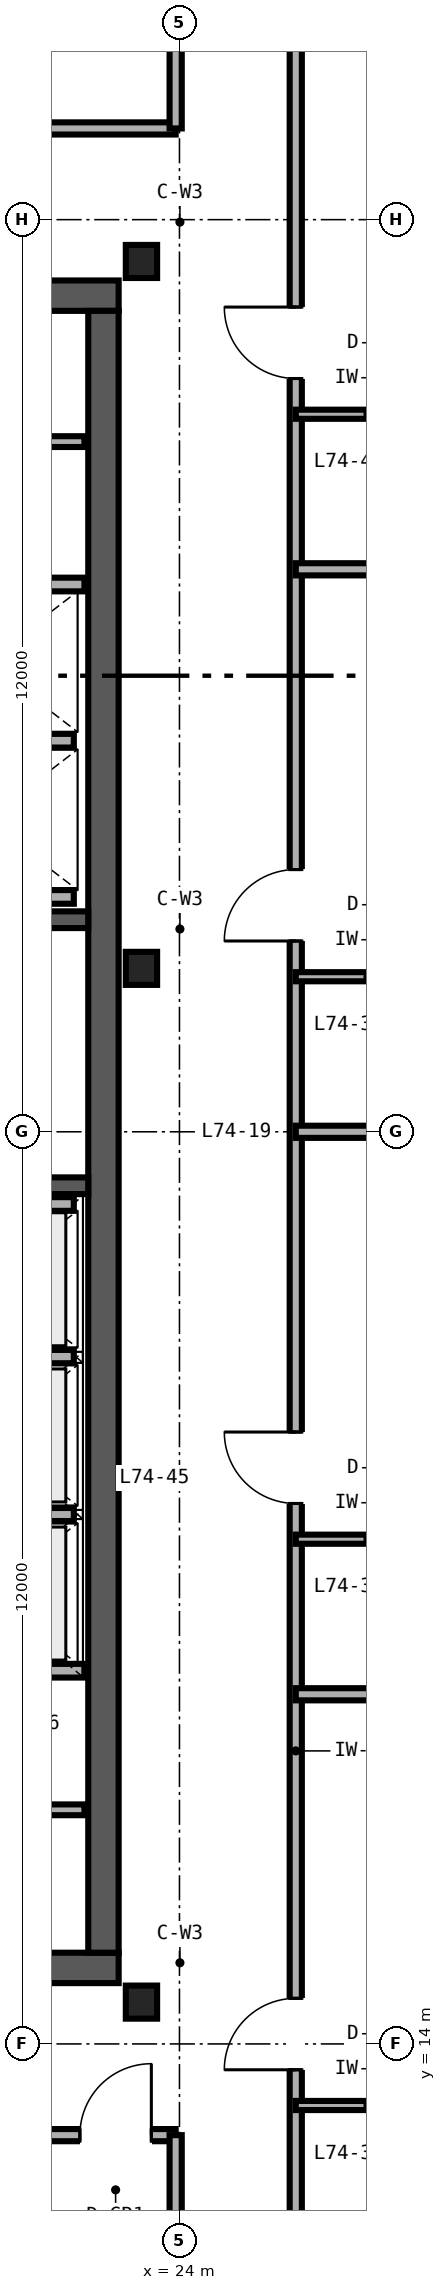
"""IFC4 building model, lengths in metres.
Left out: names, types, materials, properties, quantities, classifications, styles, units other than length and angle.
Written with IfcOpenShell. Run it as: python <this file> out.ifc"""

import sys

from ifc_helpers import new_model, si_unit, direction, frame, frame_2d, origin, origin_2d, place, context, subcontext, project, spatial, rectangle, i_section, extrude, source, transform, mapped, element, fill, save


model = new_model("IFC4")
c1 = context("Model", 3, precision=1e-05, world=origin(), true_north=direction((0.0, 1.0)))
c2 = subcontext(c1, "Body", "Model", "MODEL_VIEW")
j1 = project(units=[si_unit("LENGTHUNIT", "METRE"), si_unit("PLANEANGLEUNIT", "RADIAN")], contexts=[c1])
p1 = place(None, origin())
s1 = spatial("IfcSite", under=j1, at=p1, CompositionType="ELEMENT")
p2 = place(p1, origin())
s2 = spatial("IfcBuilding", under=s1, at=p2, CompositionType="ELEMENT")
p3 = place(p2, frame((0.0, 0.0, 290.4)))
s3 = spatial("IfcBuildingStorey", under=s2, at=p3, CompositionType="ELEMENT", Elevation=290.4)
p4 = place(p3, frame((10.8, 15.0, 0.0), z_axis=(0.0, 0.0, 1.0), x_axis=(1.0, 0.0, 0.0)))
e1 = element("IfcWall", 1, at=p4, inside=s3, PredefinedType="SHEAR", context=c2, shape_type="SweptSolid", body=[
    extrude(rectangle(XDim=12.4, YDim=0.4, at=frame_2d((6.2, 0.0))), origin(), (0.0, 0.0, 1.0), 3.38),
])
p5 = place(p4, frame((10.1, 0.0, 0.0)))
e2 = element("IfcOpeningElement", 2, at=p5, cuts=e1, PredefinedType="OPENING", context=c2, shape_type="SweptSolid", body=[
    extrude(rectangle(XDim=1.0, YDim=2.15, at=frame_2d((0.5, 1.075))), frame((0.0, 0.21, 0.0), z_axis=(0.0, -1.0, 0.0), x_axis=(1.0, 0.0, 0.0)), (0.0, 0.0, 1.0), 0.42),
])
p6 = place(p3, frame((10.8, 37.0, 0.0), z_axis=(0.0, 0.0, 1.0), x_axis=(1.0, 0.0, 0.0)))
e3 = element("IfcWall", 3, at=p6, inside=s3, PredefinedType="SHEAR", context=c2, shape_type="SweptSolid", body=[
    extrude(rectangle(XDim=12.4, YDim=0.4, at=frame_2d((6.2, 0.0))), origin(), (0.0, 0.0, 1.0), 3.38),
])
p7 = place(p6, frame((10.3, 0.0, 0.0)))
e4 = element("IfcOpeningElement", 4, at=p7, cuts=e3, PredefinedType="OPENING", context=c2, shape_type="SweptSolid", body=[
    extrude(rectangle(XDim=1.0, YDim=2.15, at=frame_2d((0.5, 1.075))), frame((0.0, 0.21, 0.0), z_axis=(0.0, -1.0, 0.0), x_axis=(1.0, 0.0, 0.0)), (0.0, 0.0, 1.0), 0.42),
])
p8 = place(p3, frame((23.0, 15.2, 0.0), z_axis=(0.0, 0.0, 1.0), x_axis=(0.0, 1.0, 0.0)))
e5 = element("IfcWall", 5, at=p8, inside=s3, PredefinedType="SHEAR", context=c2, shape_type="SweptSolid", body=[
    extrude(rectangle(XDim=21.6, YDim=0.4, at=frame_2d((10.8, 0.0))), origin(), (0.0, 0.0, 1.0), 3.38),
])
p9 = place(p3, frame((14.18, 25.29, 0.0), z_axis=(0.0, 0.0, 1.0), x_axis=(1.0, 0.0, 0.0)))
e6 = element("IfcWall", 6, at=p9, inside=s3, PredefinedType="SHEAR", context=c2, shape_type="SweptSolid", body=[
    extrude(rectangle(XDim=8.62, YDim=0.22, at=frame_2d((4.31, 0.0))), origin(), (0.0, 0.0, 1.0), 3.4),
])
p10 = place(p9, frame((0.47, 0.0, 0.0)))
e7 = element("IfcOpeningElement", 7, at=p10, cuts=e6, PredefinedType="OPENING", context=c2, shape_type="SweptSolid", body=[
    extrude(rectangle(XDim=1.05, YDim=2.15, at=frame_2d((0.525, 1.075))), frame((0.0, 0.12, 0.0), z_axis=(0.0, -1.0, 0.0), x_axis=(1.0, 0.0, 0.0)), (0.0, 0.0, 1.0), 0.24),
])
p11 = place(p3, frame((14.18, 28.79, 0.0), z_axis=(0.0, 0.0, 1.0), x_axis=(1.0, 0.0, 0.0)))
e8 = element("IfcWall", 8, at=p11, inside=s3, PredefinedType="SHEAR", context=c2, shape_type="SweptSolid", body=[
    extrude(rectangle(XDim=8.62, YDim=0.22, at=frame_2d((4.31, 0.0))), origin(), (0.0, 0.0, 1.0), 3.4),
])
m1 = source(origin(), c2, "Body", "SweptSolid", [
    extrude(i_section(OverallWidth=0.412, OverallDepth=0.435, WebThickness=0.036, FlangeThickness=0.057, FilletRadius=0.025, at=origin_2d()), origin(), (0.0, 0.0, 1.0), 3.38),
])
for number, where, z_axis, x_axis in (
    (9, (23.5, 14.55, 0.0), (0.0, 0.0, 1.0), (1.0, 0.0, 0.0)),
    (10, (23.5, 28.15, 0.0), (0.0, 0.0, 1.0), (1.0, 0.0, 0.0)),
    (11, (23.5, 37.45, 0.0), (0.0, 0.0, 1.0), (1.0, 0.0, 0.0)),
):
    element("IfcColumn", number, at=place(p3, frame(where, z_axis=z_axis, x_axis=x_axis)), inside=s3, PredefinedType="COLUMN", context=c2, shape_type="MappedRepresentation", body=[
        mapped(m1, transform((0.0, 0.0, 0.0), scale=1.0)),
    ])
p12 = place(p3, frame((20.12, 18.91, 0.0), z_axis=(0.0, 0.0, 1.0), x_axis=(1.0, 0.0, 0.0)))
e12 = element("IfcWall", 12, at=p12, inside=s3, PredefinedType="SOLIDWALL", context=c2, shape_type="SweptSolid", body=[
    extrude(rectangle(XDim=2.63, YDim=0.18, at=frame_2d((1.315, 0.0))), origin(), (0.0, 0.0, 1.0), 3.38),
])
p13 = place(p3, frame((20.25, 25.05, 0.0), z_axis=(0.0, 0.0, 1.0), x_axis=(1.0, 0.0, 0.0)))
e13 = element("IfcWall", 13, at=p13, inside=s3, PredefinedType="SOLIDWALL", context=c2, shape_type="SweptSolid", body=[
    extrude(rectangle(XDim=2.36, YDim=0.18, at=frame_2d((1.18, 0.0))), origin(), (0.0, 0.0, 1.0), 3.38),
])
p14 = place(p3, frame((20.25, 20.965, 0.0), z_axis=(0.0, 0.0, 1.0), x_axis=(1.0, 0.0, 0.0)))
e14 = element("IfcWall", 14, at=p14, inside=s3, PredefinedType="SOLIDWALL", context=c2, shape_type="SweptSolid", body=[
    extrude(rectangle(XDim=2.36, YDim=0.18, at=frame_2d((1.18, 0.0))), origin(), (0.0, 0.0, 1.0), 2.48),
])
for number, where, z_axis, x_axis in (
    (15, (20.25, 23.045, 0.0), (0.0, 0.0, 1.0), (1.0, 0.0, 0.0)),
    (16, (20.25, 29.09, 0.0), (0.0, 0.0, 1.0), (1.0, 0.0, 0.0)),
):
    element("IfcWall", number, at=place(p3, frame(where, z_axis=z_axis, x_axis=x_axis)), inside=s3, PredefinedType="SOLIDWALL", context=c2, shape_type="SweptSolid", body=[
        extrude(rectangle(XDim=2.36, YDim=0.18, at=frame_2d((1.18, 0.0))), origin(), (0.0, 0.0, 1.0), 3.38),
    ])
p15 = place(p3, frame((20.25, 33.2, 0.0), z_axis=(0.0, 0.0, 1.0), x_axis=(1.0, 0.0, 0.0)))
e17 = element("IfcWall", 17, at=p15, inside=s3, PredefinedType="SOLIDWALL", context=c2, shape_type="SweptSolid", body=[
    extrude(rectangle(XDim=2.5, YDim=0.18, at=frame_2d((1.25, 0.0))), origin(), (0.0, 0.0, 1.0), 3.38),
])
p16 = place(p3, frame((20.25, 31.145, 0.0), z_axis=(0.0, 0.0, 1.0), x_axis=(1.0, 0.0, 0.0)))
e18 = element("IfcWall", 18, at=p16, inside=s3, PredefinedType="SOLIDWALL", context=c2, shape_type="SweptSolid", body=[
    extrude(rectangle(XDim=2.36, YDim=0.18, at=frame_2d((1.18, 0.0))), origin(), (0.0, 0.0, 1.0), 3.38),
])
p17 = place(p3, frame((20.12, 17.08, 0.0), z_axis=(0.0, 0.0, 1.0), x_axis=(1.0, 0.0, 0.0)))
e19 = element("IfcWall", 19, at=p17, inside=s3, PredefinedType="PARTITIONING", context=c2, shape_type="SweptSolid", body=[
    extrude(rectangle(XDim=2.63, YDim=0.142, at=frame_2d((1.315, 0.0))), origin(), (0.0, 0.0, 1.0), 3.38),
])
p18 = place(p17, frame((0.85, 0.0, 0.0)))
e20 = element("IfcOpeningElement", 20, at=p18, cuts=e19, PredefinedType="OPENING", context=c2, shape_type="SweptSolid", body=[
    extrude(rectangle(XDim=0.84, YDim=2.1, at=frame_2d((0.42, 1.05))), frame((0.0, 0.081, 0.0), z_axis=(0.0, -1.0, 0.0), x_axis=(1.0, 0.0, 0.0)), (0.0, 0.0, 1.0), 0.162),
])
p19 = place(p3, frame((20.12, 35.08, 0.0), z_axis=(0.0, 0.0, 1.0), x_axis=(1.0, 0.0, 0.0)))
e21 = element("IfcWall", 21, at=p19, inside=s3, PredefinedType="PARTITIONING", context=c2, shape_type="SweptSolid", body=[
    extrude(rectangle(XDim=2.63, YDim=0.142, at=frame_2d((1.315, 0.0))), origin(), (0.0, 0.0, 1.0), 3.38),
])
p20 = place(p19, frame((0.85, 0.0, 0.0)))
e22 = element("IfcOpeningElement", 22, at=p20, cuts=e21, PredefinedType="OPENING", context=c2, shape_type="SweptSolid", body=[
    extrude(rectangle(XDim=0.84, YDim=2.1, at=frame_2d((0.42, 1.05))), frame((0.0, 0.081, 0.0), z_axis=(0.0, -1.0, 0.0), x_axis=(1.0, 0.0, 0.0)), (0.0, 0.0, 1.0), 0.162),
])
p21 = place(p3, frame((11.2, 12.8, 0.0), z_axis=(0.0, 0.0, 1.0), x_axis=(1.0, 0.0, 0.0)))
e23 = element("IfcWall", 23, at=p21, inside=s3, PredefinedType="PARTITIONING", context=c2, shape_type="SweptSolid", body=[
    extrude(rectangle(XDim=12.75, YDim=0.16, at=frame_2d((6.375, 0.0))), origin(), (0.0, 0.0, 1.0), 3.38),
])
p22 = place(p21, frame((5.14, 0.0, 0.0)))
e24 = element("IfcOpeningElement", 24, at=p22, cuts=e23, PredefinedType="OPENING", context=c2, shape_type="SweptSolid", body=[
    extrude(rectangle(XDim=0.94, YDim=2.15, at=frame_2d((0.47, 1.075))), frame((0.0, 0.09, 0.0), z_axis=(0.0, -1.0, 0.0), x_axis=(1.0, 0.0, 0.0)), (0.0, 0.0, 1.0), 0.18),
])
p23 = place(p21, frame((11.49, 0.0, 0.0)))
e25 = element("IfcOpeningElement", 25, at=p23, cuts=e23, PredefinedType="OPENING", context=c2, shape_type="SweptSolid", body=[
    extrude(rectangle(XDim=0.94, YDim=2.15, at=frame_2d((0.47, 1.075))), frame((0.0, 0.09, 0.0), z_axis=(0.0, -1.0, 0.0), x_axis=(1.0, 0.0, 0.0)), (0.0, 0.0, 1.0), 0.18),
])
p24 = place(p3, frame((23.95, 8.36, 0.0), z_axis=(0.0, 0.0, 1.0), x_axis=(0.0, 1.0, 0.0)))
e26 = element("IfcWall", 26, at=p24, inside=s3, PredefinedType="PARTITIONING", context=c2, shape_type="SweptSolid", body=[
    extrude(rectangle(XDim=4.44, YDim=0.16, at=frame_2d((2.22, 0.0))), origin(), (0.0, 0.0, 1.0), 3.38),
])
p25 = place(p3, frame((11.2, 39.2, 0.0), z_axis=(0.0, 0.0, 1.0), x_axis=(1.0, 0.0, 0.0)))
e27 = element("IfcWall", 27, at=p25, inside=s3, PredefinedType="PARTITIONING", context=c2, shape_type="SweptSolid", body=[
    extrude(rectangle(XDim=12.75, YDim=0.16, at=frame_2d((6.375, 0.0))), origin(), (0.0, 0.0, 1.0), 3.38),
])
p26 = place(p25, frame((5.14, 0.0, 0.0)))
e28 = element("IfcOpeningElement", 28, at=p26, cuts=e27, PredefinedType="OPENING", context=c2, shape_type="SweptSolid", body=[
    extrude(rectangle(XDim=0.94, YDim=2.15, at=frame_2d((0.47, 1.075))), frame((0.0, 0.09, 0.0), z_axis=(0.0, -1.0, 0.0), x_axis=(1.0, 0.0, 0.0)), (0.0, 0.0, 1.0), 0.18),
])
p27 = place(p25, frame((9.095, 0.0, 0.0)))
e29 = element("IfcOpeningElement", 29, at=p27, cuts=e27, PredefinedType="OPENING", context=c2, shape_type="SweptSolid", body=[
    extrude(rectangle(XDim=0.96, YDim=2.15, at=frame_2d((0.48, 1.075))), frame((0.0, 0.09, 0.0), z_axis=(0.0, -1.0, 0.0), x_axis=(1.0, 0.0, 0.0)), (0.0, 0.0, 1.0), 0.18),
])
p28 = place(p3, frame((23.95, 39.2, 0.0), z_axis=(0.0, 0.0, 1.0), x_axis=(0.0, 1.0, 0.0)))
e30 = element("IfcWall", 30, at=p28, inside=s3, PredefinedType="PARTITIONING", context=c2, shape_type="SweptSolid", body=[
    extrude(rectangle(XDim=4.44, YDim=0.16, at=frame_2d((2.22, 0.0))), origin(), (0.0, 0.0, 1.0), 3.38),
])
p29 = place(p3, frame((25.53, 11.15, 0.0), z_axis=(0.0, 0.0, 1.0), x_axis=(0.0, 1.0, 0.0)))
e31 = element("IfcWall", 31, at=p29, inside=s3, PredefinedType="PARTITIONING", context=c2, shape_type="SweptSolid", body=[
    extrude(rectangle(XDim=29.7, YDim=0.16, at=frame_2d((14.85, 0.0))), origin(), (0.0, 0.0, 1.0), 2.524),
])
p30 = place(p29, frame((2.51, 0.0, 0.0)))
e32 = element("IfcOpeningElement", 32, at=p30, cuts=e31, PredefinedType="OPENING", context=c2, shape_type="SweptSolid", body=[
    extrude(rectangle(XDim=0.94, YDim=2.15, at=frame_2d((0.47, 1.075))), frame((0.0, 0.09, 0.0), z_axis=(0.0, -1.0, 0.0), x_axis=(1.0, 0.0, 0.0)), (0.0, 0.0, 1.0), 0.18),
])
p31 = place(p29, frame((9.96, 0.0, 0.0)))
e33 = element("IfcOpeningElement", 33, at=p31, cuts=e31, PredefinedType="OPENING", context=c2, shape_type="SweptSolid", body=[
    extrude(rectangle(XDim=0.94, YDim=2.15, at=frame_2d((0.47, 1.075))), frame((0.0, 0.09, 0.0), z_axis=(0.0, -1.0, 0.0), x_axis=(1.0, 0.0, 0.0)), (0.0, 0.0, 1.0), 0.18),
])
p32 = place(p29, frame((17.36, 0.0, 0.0)))
e34 = element("IfcOpeningElement", 34, at=p32, cuts=e31, PredefinedType="OPENING", context=c2, shape_type="SweptSolid", body=[
    extrude(rectangle(XDim=0.94, YDim=2.15, at=frame_2d((0.47, 1.075))), frame((0.0, 0.09, 0.0), z_axis=(0.0, -1.0, 0.0), x_axis=(1.0, 0.0, 0.0)), (0.0, 0.0, 1.0), 0.18),
])
p33 = place(p29, frame((24.76, 0.0, 0.0)))
e35 = element("IfcOpeningElement", 35, at=p33, cuts=e31, PredefinedType="OPENING", context=c2, shape_type="SweptSolid", body=[
    extrude(rectangle(XDim=0.94, YDim=2.15, at=frame_2d((0.47, 1.075))), frame((0.0, 0.09, 0.0), z_axis=(0.0, -1.0, 0.0), x_axis=(1.0, 0.0, 0.0)), (0.0, 0.0, 1.0), 0.18),
])
p34 = place(p3, frame((25.53, 18.6, 0.0), z_axis=(0.0, 0.0, 1.0), x_axis=(1.0, 0.0, 0.0)))
e36 = element("IfcWall", 36, at=p34, inside=s3, PredefinedType="PARTITIONING", context=c2, shape_type="SweptSolid", body=[
    extrude(rectangle(XDim=7.15, YDim=0.16, at=frame_2d((3.575, 0.0))), origin(), (0.0, 0.0, 1.0), 2.601),
])
p35 = place(p3, frame((25.53, 13.19, 0.0), z_axis=(0.0, 0.0, 1.0), x_axis=(1.0, 0.0, 0.0)))
e37 = element("IfcWall", 37, at=p35, inside=s3, PredefinedType="PARTITIONING", context=c2, shape_type="SweptSolid", body=[
    extrude(rectangle(XDim=1.9, YDim=0.12, at=frame_2d((0.95, 0.0))), origin(), (0.0, 0.0, 1.0), 3.38),
])
p36 = place(p3, frame((25.53, 26.0, 0.0), z_axis=(0.0, 0.0, 1.0), x_axis=(1.0, 0.0, 0.0)))
e38 = element("IfcWall", 38, at=p36, inside=s3, PredefinedType="PARTITIONING", context=c2, shape_type="SweptSolid", body=[
    extrude(rectangle(XDim=7.15, YDim=0.16, at=frame_2d((3.575, 0.0))), origin(), (0.0, 0.0, 1.0), 2.601),
])
p37 = place(p3, frame((25.53, 20.64, 0.0), z_axis=(0.0, 0.0, 1.0), x_axis=(1.0, 0.0, 0.0)))
e39 = element("IfcWall", 39, at=p37, inside=s3, PredefinedType="PARTITIONING", context=c2, shape_type="SweptSolid", body=[
    extrude(rectangle(XDim=1.9, YDim=0.12, at=frame_2d((0.95, 0.0))), origin(), (0.0, 0.0, 1.0), 3.38),
])
p38 = place(p3, frame((25.53, 33.4, 0.0), z_axis=(0.0, 0.0, 1.0), x_axis=(1.0, 0.0, 0.0)))
e40 = element("IfcWall", 40, at=p38, inside=s3, PredefinedType="PARTITIONING", context=c2, shape_type="SweptSolid", body=[
    extrude(rectangle(XDim=7.15, YDim=0.16, at=frame_2d((3.575, 0.0))), origin(), (0.0, 0.0, 1.0), 2.763),
])
p39 = place(p3, frame((25.53, 28.04, 0.0), z_axis=(0.0, 0.0, 1.0), x_axis=(1.0, 0.0, 0.0)))
e41 = element("IfcWall", 41, at=p39, inside=s3, PredefinedType="PARTITIONING", context=c2, shape_type="SweptSolid", body=[
    extrude(rectangle(XDim=1.9, YDim=0.12, at=frame_2d((0.95, 0.0))), origin(), (0.0, 0.0, 1.0), 2.524),
])
p40 = place(p3, frame((25.53, 35.44, 0.0), z_axis=(0.0, 0.0, 1.0), x_axis=(1.0, 0.0, 0.0)))
e42 = element("IfcWall", 42, at=p40, inside=s3, PredefinedType="PARTITIONING", context=c2, shape_type="SweptSolid", body=[
    extrude(rectangle(XDim=1.9, YDim=0.12, at=frame_2d((0.95, 0.0))), origin(), (0.0, 0.0, 1.0), 3.38),
])
m2 = source(origin(), c2, "Body", "SweptSolid", [
    extrude(rectangle(XDim=0.94, YDim=2.15, at=frame_2d((0.47, 1.075))), frame((0.0, 0.025, 0.0), z_axis=(0.0, -1.0, 0.0), x_axis=(1.0, 0.0, 0.0)), (0.0, 0.0, 1.0), 0.05),
])
p41 = place(p23, origin())
e43 = element("IfcDoor", 43, at=p41, inside=s3, OperationType="SINGLE_SWING_RIGHT", PredefinedType="DOOR", context=c2, shape_type="MappedRepresentation", body=[
    mapped(m2, transform((0.0, 0.0, 0.0), scale=1.0)),
])
fill(e25, e43)
p42 = place(p30, origin())
e44 = element("IfcDoor", 44, at=p42, inside=s3, OperationType="SINGLE_SWING_LEFT", PredefinedType="DOOR", context=c2, shape_type="MappedRepresentation", body=[
    mapped(m2, transform((0.0, 0.0, 0.0), scale=1.0)),
])
fill(e32, e44)
p43 = place(p31, origin())
e45 = element("IfcDoor", 45, at=p43, inside=s3, OperationType="SINGLE_SWING_RIGHT", PredefinedType="DOOR", context=c2, shape_type="MappedRepresentation", body=[
    mapped(m2, transform((0.0, 0.0, 0.0), scale=1.0)),
])
fill(e33, e45)
p44 = place(p32, origin())
e46 = element("IfcDoor", 46, at=p44, inside=s3, OperationType="SINGLE_SWING_LEFT", PredefinedType="DOOR", context=c2, shape_type="MappedRepresentation", body=[
    mapped(m2, transform((0.0, 0.0, 0.0), scale=1.0)),
])
fill(e34, e46)
p45 = place(p33, origin())
e47 = element("IfcDoor", 47, at=p45, inside=s3, OperationType="SINGLE_SWING_RIGHT", PredefinedType="DOOR", context=c2, shape_type="MappedRepresentation", body=[
    mapped(m2, transform((0.0, 0.0, 0.0), scale=1.0)),
])
fill(e35, e47)
save(model, sys.argv[1])
